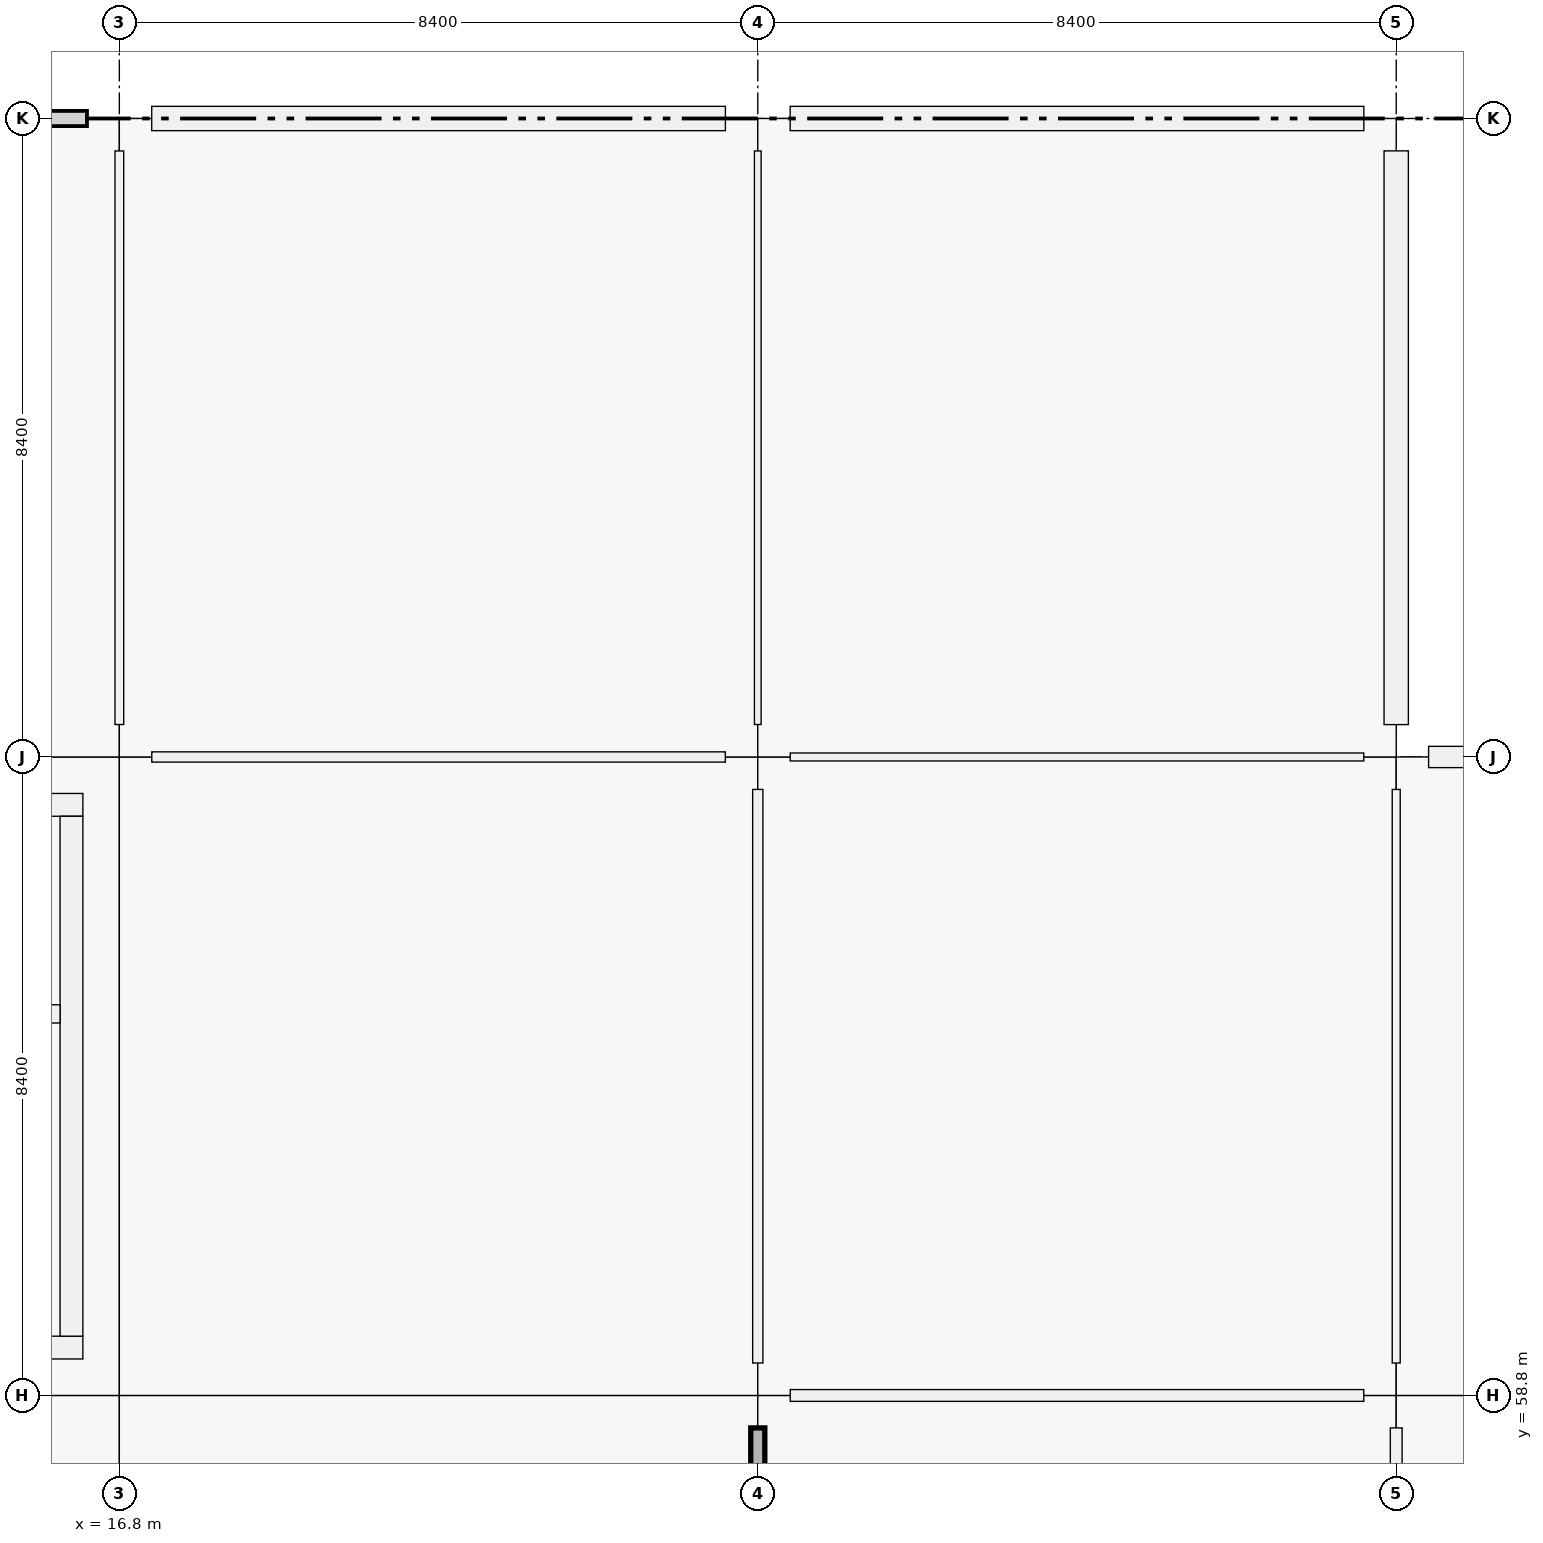
"""IFC4 building model, lengths in metres.
Left out: names, types, materials, properties, quantities, classifications, styles, units other than length and angle.
Written with IfcOpenShell. Run it as: python <this file> out.ifc"""

import sys

from ifc_helpers import new_model, si_unit, direction, frame, frame_2d, origin, origin_2d, place, context, subcontext, project, spatial, rectangle, extrude, element, fill, save


model = new_model("IFC4")
c1 = context("Model", 3, precision=1e-05, world=origin(), true_north=direction((0.0, 1.0)))
c2 = subcontext(c1, "Body", "Model", "MODEL_VIEW")
j1 = project(units=[si_unit("LENGTHUNIT", "METRE"), si_unit("PLANEANGLEUNIT", "RADIAN")], contexts=[c1])
p1 = place(None, origin())
s1 = spatial("IfcSite", under=j1, at=p1, CompositionType="ELEMENT")
p2 = place(p1, origin())
s2 = spatial("IfcBuilding", under=s1, at=p2, CompositionType="ELEMENT")
p3 = place(p2, origin())
s3 = spatial("IfcBuildingStorey", under=s2, at=p3, CompositionType="ELEMENT", Elevation=0.0)
for number, where, z_axis, x_axis in (
    (1, (16.8, 58.8, 0.0), (0.0, 0.0, 1.0), (1.0, 0.0, 0.0)),
    (2, (16.8, 67.2, 0.0), (0.0, 0.0, 1.0), (1.0, 0.0, 0.0)),
    (3, (16.8, 75.6, 0.0), (0.0, 0.0, 1.0), (1.0, 0.0, 0.0)),
    (4, (25.2, 58.8, 0.0), (0.0, 0.0, 1.0), (1.0, 0.0, 0.0)),
    (5, (25.2, 67.2, 0.0), (0.0, 0.0, 1.0), (1.0, 0.0, 0.0)),
    (6, (25.2, 75.6, 0.0), (0.0, 0.0, 1.0), (1.0, 0.0, 0.0)),
    (7, (33.6, 58.8, 0.0), (0.0, 0.0, 1.0), (1.0, 0.0, 0.0)),
    (8, (33.6, 67.2, 0.0), (0.0, 0.0, 1.0), (1.0, 0.0, 0.0)),
    (9, (33.6, 75.6, 0.0), (0.0, 0.0, 1.0), (1.0, 0.0, 0.0)),
):
    element("IfcColumn", number, at=place(p3, frame(where, z_axis=z_axis, x_axis=x_axis)), inside=s3, PredefinedType="COLUMN", context=c2, shape_type="SweptSolid", body=[
        extrude(rectangle(XDim=0.85, YDim=0.85, at=origin_2d()), origin(), (0.0, 0.0, 1.0), 5.76),
    ])
p4 = place(p3, frame((17.226, 75.6, 0.0), z_axis=(0.0, 0.0, 1.0), x_axis=(1.0, 0.0, 0.0)))
e10 = element("IfcWall", 10, at=p4, inside=s3, PredefinedType="SOLIDWALL", context=c2, shape_type="SweptSolid", body=[
    extrude(rectangle(XDim=7.548, YDim=0.32, at=frame_2d((3.774, 0.0))), origin(), (0.0, 0.0, 1.0), 4.7),
])
p5 = place(p4, frame((2.474, 0.0, 0.9)))
e11 = element("IfcOpeningElement", 11, at=p5, cuts=e10, PredefinedType="OPENING", context=c2, shape_type="SweptSolid", body=[
    extrude(rectangle(XDim=2.6, YDim=2.1, at=frame_2d((1.3, 1.05))), frame((0.0, 0.16, 0.0), z_axis=(0.0, -1.0, 0.0), x_axis=(1.0, 0.0, 0.0)), (0.0, 0.0, 1.0), 0.32),
])
p6 = place(p3, frame((25.626, 75.6, 0.0), z_axis=(0.0, 0.0, 1.0), x_axis=(1.0, 0.0, 0.0)))
e12 = element("IfcWall", 12, at=p6, inside=s3, PredefinedType="SOLIDWALL", context=c2, shape_type="SweptSolid", body=[
    extrude(rectangle(XDim=7.548, YDim=0.32, at=frame_2d((3.774, 0.0))), origin(), (0.0, 0.0, 1.0), 4.7),
])
p7 = place(p6, frame((2.374, 0.0, 0.9)))
e13 = element("IfcOpeningElement", 13, at=p7, cuts=e12, PredefinedType="OPENING", context=c2, shape_type="SweptSolid", body=[
    extrude(rectangle(XDim=2.8, YDim=1.75, at=frame_2d((1.4, 0.875))), frame((0.0, 0.16, 0.0), z_axis=(0.0, -1.0, 0.0), x_axis=(1.0, 0.0, 0.0)), (0.0, 0.0, 1.0), 0.32),
])
p8 = place(p3, frame((33.6, 75.174, 0.0), z_axis=(0.0, 0.0, 1.0), x_axis=(0.0, -1.0, 0.0)))
e14 = element("IfcWall", 14, at=p8, inside=s3, PredefinedType="SOLIDWALL", context=c2, shape_type="SweptSolid", body=[
    extrude(rectangle(XDim=7.548, YDim=0.32, at=frame_2d((3.774, 0.0))), origin(), (0.0, 0.0, 1.0), 4.7),
])
p9 = place(p8, frame((2.824, 0.0, 0.9)))
e15 = element("IfcOpeningElement", 15, at=p9, cuts=e14, PredefinedType="OPENING", context=c2, shape_type="SweptSolid", body=[
    extrude(rectangle(XDim=1.9, YDim=1.75, at=frame_2d((0.95, 0.875))), frame((0.0, 0.16, 0.0), z_axis=(0.0, -1.0, 0.0), x_axis=(1.0, 0.0, 0.0)), (0.0, 0.0, 1.0), 0.32),
])
p10 = place(p3, frame((34.026, 67.2, 0.0), z_axis=(0.0, 0.0, 1.0), x_axis=(1.0, 0.0, 0.0)))
e16 = element("IfcWall", 16, at=p10, inside=s3, PredefinedType="SOLIDWALL", context=c2, shape_type="SweptSolid", body=[
    extrude(rectangle(XDim=7.548, YDim=0.28, at=frame_2d((3.774, 0.0))), origin(), (0.0, 0.0, 1.0), 4.7),
])
p11 = place(p10, frame((3.074, 0.0, 0.9)))
e17 = element("IfcOpeningElement", 17, at=p11, cuts=e16, PredefinedType="OPENING", context=c2, shape_type="SweptSolid", body=[
    extrude(rectangle(XDim=1.4, YDim=1.75, at=frame_2d((0.7, 0.875))), frame((0.0, 0.14, 0.0), z_axis=(0.0, -1.0, 0.0), x_axis=(1.0, 0.0, 0.0)), (0.0, 0.0, 1.0), 0.28),
])
p12 = place(p3, frame((16.32, 59.43, 0.0), z_axis=(0.0, 0.0, 1.0), x_axis=(-1.0, 0.0, 0.0)))
e18 = element("IfcWall", 18, at=p12, inside=s3, PredefinedType="SHEAR", context=c2, shape_type="SweptSolid", body=[
    extrude(rectangle(XDim=7.44, YDim=0.3, at=frame_2d((3.72, 0.0))), origin(), (0.0, 0.0, 1.0), 5.76),
])
p13 = place(p12, frame((1.28, 0.0, 0.0)))
e19 = element("IfcOpeningElement", 19, at=p13, cuts=e18, PredefinedType="OPENING", context=c2, shape_type="SweptSolid", body=[
    extrude(rectangle(XDim=1.5, YDim=2.15, at=frame_2d((0.75, 1.075))), frame((0.0, 0.15, 0.0), z_axis=(0.0, -1.0, 0.0), x_axis=(1.0, 0.0, 0.0)), (0.0, 0.0, 1.0), 0.3),
])
p14 = place(p3, frame((8.88, 66.57, 0.0), z_axis=(0.0, 0.0, 1.0), x_axis=(1.0, 0.0, 0.0)))
e20 = element("IfcWall", 20, at=p14, inside=s3, PredefinedType="SHEAR", context=c2, shape_type="SweptSolid", body=[
    extrude(rectangle(XDim=7.44, YDim=0.3, at=frame_2d((3.72, 0.0))), origin(), (0.0, 0.0, 1.0), 5.76),
])
p15 = place(p3, frame((16.17, 66.42, 0.0), z_axis=(0.0, 0.0, 1.0), x_axis=(0.0, -1.0, 0.0)))
e21 = element("IfcWall", 21, at=p15, inside=s3, PredefinedType="SHEAR", context=c2, shape_type="SweptSolid", body=[
    extrude(rectangle(XDim=6.84, YDim=0.3, at=frame_2d((3.42, 0.0))), origin(), (0.0, 0.0, 1.0), 5.76),
])
p16 = place(p3, frame((12.56, 63.82, 0.0), z_axis=(0.0, 0.0, 1.0), x_axis=(1.0, 0.0, 0.0)))
e22 = element("IfcWall", 22, at=p16, inside=s3, PredefinedType="SHEAR", context=c2, shape_type="SweptSolid", body=[
    extrude(rectangle(XDim=3.46, YDim=0.24, at=frame_2d((1.73, 0.0))), origin(), (0.0, 0.0, 1.0), 5.76),
])
p17 = place(p16, frame((1.18, 0.0, 0.0)))
e23 = element("IfcOpeningElement", 23, at=p17, cuts=e22, PredefinedType="OPENING", context=c2, shape_type="SweptSolid", body=[
    extrude(rectangle(XDim=1.1, YDim=2.15, at=frame_2d((0.55, 1.075))), frame((0.0, 0.12, 0.0), z_axis=(0.0, -1.0, 0.0), x_axis=(1.0, 0.0, 0.0)), (0.0, 0.0, 1.0), 0.24),
])
p18 = place(p3, frame((17.227, 67.2, 0.0), z_axis=(0.0, 0.0, 1.0), x_axis=(1.0, 0.0, 0.0)))
e24 = element("IfcWall", 24, at=p18, inside=s3, PredefinedType="PARTITIONING", context=c2, shape_type="SweptSolid", body=[
    extrude(rectangle(XDim=7.546, YDim=0.135, at=frame_2d((3.773, 0.0))), origin(), (0.0, 0.0, 1.0), 3.66),
])
p19 = place(p18, frame((3.283, 0.0, 0.0)))
e25 = element("IfcOpeningElement", 25, at=p19, cuts=e24, PredefinedType="OPENING", context=c2, shape_type="SweptSolid", body=[
    extrude(rectangle(XDim=0.98, YDim=2.18, at=frame_2d((0.49, 1.09))), frame((0.0, 0.067, 0.0), z_axis=(0.0, -1.0, 0.0), x_axis=(1.0, 0.0, 0.0)), (0.0, 0.0, 1.0), 0.135),
])
p20 = place(p3, frame((25.627, 58.8, 0.0), z_axis=(0.0, 0.0, 1.0), x_axis=(1.0, 0.0, 0.0)))
e26 = element("IfcWall", 26, at=p20, inside=s3, PredefinedType="PARTITIONING", context=c2, shape_type="SweptSolid", body=[
    extrude(rectangle(XDim=7.546, YDim=0.155, at=frame_2d((3.773, 0.0))), origin(), (0.0, 0.0, 1.0), 3.66),
])
p21 = place(p20, frame((3.243, 0.0, 0.0)))
e27 = element("IfcOpeningElement", 27, at=p21, cuts=e26, PredefinedType="OPENING", context=c2, shape_type="SweptSolid", body=[
    extrude(rectangle(XDim=1.06, YDim=2.25, at=frame_2d((0.53, 1.125))), frame((0.0, 0.078, 0.0), z_axis=(0.0, -1.0, 0.0), x_axis=(1.0, 0.0, 0.0)), (0.0, 0.0, 1.0), 0.155),
])
p22 = place(p3, frame((25.627, 67.2, 0.0), z_axis=(0.0, 0.0, 1.0), x_axis=(1.0, 0.0, 0.0)))
e28 = element("IfcWall", 28, at=p22, inside=s3, PredefinedType="PARTITIONING", context=c2, shape_type="SweptSolid", body=[
    extrude(rectangle(XDim=7.546, YDim=0.105, at=frame_2d((3.773, 0.0))), origin(), (0.0, 0.0, 1.0), 3.66),
])
p23 = place(p22, frame((3.248, 0.0, 0.0)))
e29 = element("IfcOpeningElement", 29, at=p23, cuts=e28, PredefinedType="OPENING", context=c2, shape_type="SweptSolid", body=[
    extrude(rectangle(XDim=1.05, YDim=2.12, at=frame_2d((0.525, 1.06))), frame((0.0, 0.052, 0.0), z_axis=(0.0, -1.0, 0.0), x_axis=(1.0, 0.0, 0.0)), (0.0, 0.0, 1.0), 0.105),
])
p24 = place(p3, frame((16.8, 67.627, 0.0), z_axis=(0.0, 0.0, 1.0), x_axis=(0.0, 1.0, 0.0)))
e30 = element("IfcWall", 30, at=p24, inside=s3, PredefinedType="PARTITIONING", context=c2, shape_type="SweptSolid", body=[
    extrude(rectangle(XDim=7.546, YDim=0.115, at=frame_2d((3.773, 0.0))), origin(), (0.0, 0.0, 1.0), 3.66),
])
p25 = place(p24, frame((3.248, 0.0, 0.0)))
e31 = element("IfcOpeningElement", 31, at=p25, cuts=e30, PredefinedType="OPENING", context=c2, shape_type="SweptSolid", body=[
    extrude(rectangle(XDim=1.05, YDim=2.12, at=frame_2d((0.525, 1.06))), frame((0.0, 0.058, 0.0), z_axis=(0.0, -1.0, 0.0), x_axis=(1.0, 0.0, 0.0)), (0.0, 0.0, 1.0), 0.115),
])
p26 = place(p3, frame((25.2, 50.827, 0.0), z_axis=(0.0, 0.0, 1.0), x_axis=(0.0, 1.0, 0.0)))
e32 = element("IfcWall", 32, at=p26, inside=s3, PredefinedType="PARTITIONING", context=c2, shape_type="SweptSolid", body=[
    extrude(rectangle(XDim=7.546, YDim=0.185, at=frame_2d((3.773, 0.0))), origin(), (0.0, 0.0, 1.0), 3.66),
])
p27 = place(p26, frame((3.303, 0.0, 0.0)))
e33 = element("IfcOpeningElement", 33, at=p27, cuts=e32, PredefinedType="OPENING", context=c2, shape_type="SweptSolid", body=[
    extrude(rectangle(XDim=0.94, YDim=2.15, at=frame_2d((0.47, 1.075))), frame((0.0, 0.093, 0.0), z_axis=(0.0, -1.0, 0.0), x_axis=(1.0, 0.0, 0.0)), (0.0, 0.0, 1.0), 0.185),
])
p28 = place(p3, frame((25.2, 59.227, 0.0), z_axis=(0.0, 0.0, 1.0), x_axis=(0.0, 1.0, 0.0)))
e34 = element("IfcWall", 34, at=p28, inside=s3, PredefinedType="PARTITIONING", context=c2, shape_type="SweptSolid", body=[
    extrude(rectangle(XDim=7.546, YDim=0.135, at=frame_2d((3.773, 0.0))), origin(), (0.0, 0.0, 1.0), 3.66),
])
p29 = place(p28, frame((3.313, 0.0, 0.0)))
e35 = element("IfcOpeningElement", 35, at=p29, cuts=e34, PredefinedType="OPENING", context=c2, shape_type="SweptSolid", body=[
    extrude(rectangle(XDim=0.92, YDim=2.15, at=frame_2d((0.46, 1.075))), frame((0.0, 0.067, 0.0), z_axis=(0.0, -1.0, 0.0), x_axis=(1.0, 0.0, 0.0)), (0.0, 0.0, 1.0), 0.135),
])
p30 = place(p3, frame((25.2, 67.627, 0.0), z_axis=(0.0, 0.0, 1.0), x_axis=(0.0, 1.0, 0.0)))
e36 = element("IfcWall", 36, at=p30, inside=s3, PredefinedType="PARTITIONING", context=c2, shape_type="SweptSolid", body=[
    extrude(rectangle(XDim=7.546, YDim=0.088, at=frame_2d((3.773, 0.0))), origin(), (0.0, 0.0, 1.0), 3.66),
])
p31 = place(p30, frame((3.288, 0.0, 0.0)))
e37 = element("IfcOpeningElement", 37, at=p31, cuts=e36, PredefinedType="OPENING", context=c2, shape_type="SweptSolid", body=[
    extrude(rectangle(XDim=0.97, YDim=2.12, at=frame_2d((0.485, 1.06))), frame((0.0, 0.044, 0.0), z_axis=(0.0, -1.0, 0.0), x_axis=(1.0, 0.0, 0.0)), (0.0, 0.0, 1.0), 0.088),
])
p32 = place(p3, frame((33.6, 50.827, 0.0), z_axis=(0.0, 0.0, 1.0), x_axis=(0.0, 1.0, 0.0)))
e38 = element("IfcWall", 38, at=p32, inside=s3, PredefinedType="PARTITIONING", context=c2, shape_type="SweptSolid", body=[
    extrude(rectangle(XDim=7.546, YDim=0.155, at=frame_2d((3.773, 0.0))), origin(), (0.0, 0.0, 1.0), 3.66),
])
p33 = place(p32, frame((3.048, 0.0, 0.0)))
e39 = element("IfcOpeningElement", 39, at=p33, cuts=e38, PredefinedType="OPENING", context=c2, shape_type="SweptSolid", body=[
    extrude(rectangle(XDim=1.45, YDim=2.2, at=frame_2d((0.725, 1.1))), frame((0.0, 0.078, 0.0), z_axis=(0.0, -1.0, 0.0), x_axis=(1.0, 0.0, 0.0)), (0.0, 0.0, 1.0), 0.155),
])
p34 = place(p3, frame((33.6, 59.227, 0.0), z_axis=(0.0, 0.0, 1.0), x_axis=(0.0, 1.0, 0.0)))
e40 = element("IfcWall", 40, at=p34, inside=s3, PredefinedType="PARTITIONING", context=c2, shape_type="SweptSolid", body=[
    extrude(rectangle(XDim=7.546, YDim=0.105, at=frame_2d((3.773, 0.0))), origin(), (0.0, 0.0, 1.0), 3.66),
])
p35 = place(p34, frame((3.073, 0.0, 0.0)))
e41 = element("IfcOpeningElement", 41, at=p35, cuts=e40, PredefinedType="OPENING", context=c2, shape_type="SweptSolid", body=[
    extrude(rectangle(XDim=1.4, YDim=2.25, at=frame_2d((0.7, 1.125))), frame((0.0, 0.052, 0.0), z_axis=(0.0, -1.0, 0.0), x_axis=(1.0, 0.0, 0.0)), (0.0, 0.0, 1.0), 0.105),
])
p36 = place(p5, origin())
e42 = element("IfcWindow", 42, at=p36, inside=s3, PartitioningType="SINGLE_PANEL", PredefinedType="WINDOW", context=c2, shape_type="SweptSolid", body=[
    extrude(rectangle(XDim=2.6, YDim=2.1, at=frame_2d((1.3, 1.05))), frame((0.0, 0.03, 0.0), z_axis=(0.0, -1.0, 0.0), x_axis=(1.0, 0.0, 0.0)), (0.0, 0.0, 1.0), 0.06),
])
fill(e11, e42)
p37 = place(p7, origin())
e43 = element("IfcWindow", 43, at=p37, inside=s3, PartitioningType="SINGLE_PANEL", PredefinedType="WINDOW", context=c2, shape_type="SweptSolid", body=[
    extrude(rectangle(XDim=2.8, YDim=1.75, at=frame_2d((1.4, 0.875))), frame((0.0, 0.03, 0.0), z_axis=(0.0, -1.0, 0.0), x_axis=(1.0, 0.0, 0.0)), (0.0, 0.0, 1.0), 0.06),
])
fill(e13, e43)
p38 = place(p9, origin())
e44 = element("IfcWindow", 44, at=p38, inside=s3, PartitioningType="SINGLE_PANEL", PredefinedType="WINDOW", context=c2, shape_type="SweptSolid", body=[
    extrude(rectangle(XDim=1.9, YDim=1.75, at=frame_2d((0.95, 0.875))), frame((0.0, 0.03, 0.0), z_axis=(0.0, -1.0, 0.0), x_axis=(1.0, 0.0, 0.0)), (0.0, 0.0, 1.0), 0.06),
])
fill(e15, e44)
p39 = place(p19, origin())
e45 = element("IfcDoor", 45, at=p39, inside=s3, OperationType="SINGLE_SWING_RIGHT", PredefinedType="DOOR", context=c2, shape_type="SweptSolid", body=[
    extrude(rectangle(XDim=0.98, YDim=2.18, at=frame_2d((0.49, 1.09))), frame((0.0, 0.025, 0.0), z_axis=(0.0, -1.0, 0.0), x_axis=(1.0, 0.0, 0.0)), (0.0, 0.0, 1.0), 0.05),
])
fill(e25, e45)
p40 = place(p29, origin())
e46 = element("IfcDoor", 46, at=p40, inside=s3, OperationType="SINGLE_SWING_RIGHT", PredefinedType="DOOR", context=c2, shape_type="SweptSolid", body=[
    extrude(rectangle(XDim=0.92, YDim=2.15, at=frame_2d((0.46, 1.075))), frame((0.0, 0.025, 0.0), z_axis=(0.0, -1.0, 0.0), x_axis=(1.0, 0.0, 0.0)), (0.0, 0.0, 1.0), 0.05),
])
fill(e35, e46)
p41 = place(p35, origin())
e47 = element("IfcDoor", 47, at=p41, inside=s3, OperationType="DOUBLE_DOOR_SINGLE_SWING", PredefinedType="DOOR", context=c2, shape_type="SweptSolid", body=[
    extrude(rectangle(XDim=1.4, YDim=2.25, at=frame_2d((0.7, 1.125))), frame((0.0, 0.025, 0.0), z_axis=(0.0, -1.0, 0.0), x_axis=(1.0, 0.0, 0.0)), (0.0, 0.0, 1.0), 0.05),
])
fill(e41, e47)
p42 = place(p23, origin())
e48 = element("IfcDoor", 48, at=p42, inside=s3, OperationType="SINGLE_SWING_LEFT", PredefinedType="DOOR", context=c2, shape_type="SweptSolid", body=[
    extrude(rectangle(XDim=1.05, YDim=2.12, at=frame_2d((0.525, 1.06))), frame((0.0, 0.025, 0.0), z_axis=(0.0, -1.0, 0.0), x_axis=(1.0, 0.0, 0.0)), (0.0, 0.0, 1.0), 0.05),
])
fill(e29, e48)
p43 = place(p21, origin())
e49 = element("IfcDoor", 49, at=p43, inside=s3, OperationType="SINGLE_SWING_RIGHT", PredefinedType="DOOR", context=c2, shape_type="SweptSolid", body=[
    extrude(rectangle(XDim=1.06, YDim=2.25, at=frame_2d((0.53, 1.125))), frame((0.0, 0.025, 0.0), z_axis=(0.0, -1.0, 0.0), x_axis=(1.0, 0.0, 0.0)), (0.0, 0.0, 1.0), 0.05),
])
fill(e27, e49)
p44 = place(p25, origin())
e50 = element("IfcDoor", 50, at=p44, inside=s3, OperationType="SINGLE_SWING_RIGHT", PredefinedType="DOOR", context=c2, shape_type="SweptSolid", body=[
    extrude(rectangle(XDim=1.05, YDim=2.12, at=frame_2d((0.525, 1.06))), frame((0.0, 0.025, 0.0), z_axis=(0.0, -1.0, 0.0), x_axis=(1.0, 0.0, 0.0)), (0.0, 0.0, 1.0), 0.05),
])
fill(e31, e50)
p45 = place(p31, origin())
e51 = element("IfcDoor", 51, at=p45, inside=s3, OperationType="SINGLE_SWING_RIGHT", PredefinedType="DOOR", context=c2, shape_type="SweptSolid", body=[
    extrude(rectangle(XDim=0.97, YDim=2.12, at=frame_2d((0.485, 1.06))), frame((0.0, 0.025, 0.0), z_axis=(0.0, -1.0, 0.0), x_axis=(1.0, 0.0, 0.0)), (0.0, 0.0, 1.0), 0.05),
])
fill(e37, e51)
save(model, sys.argv[1])
